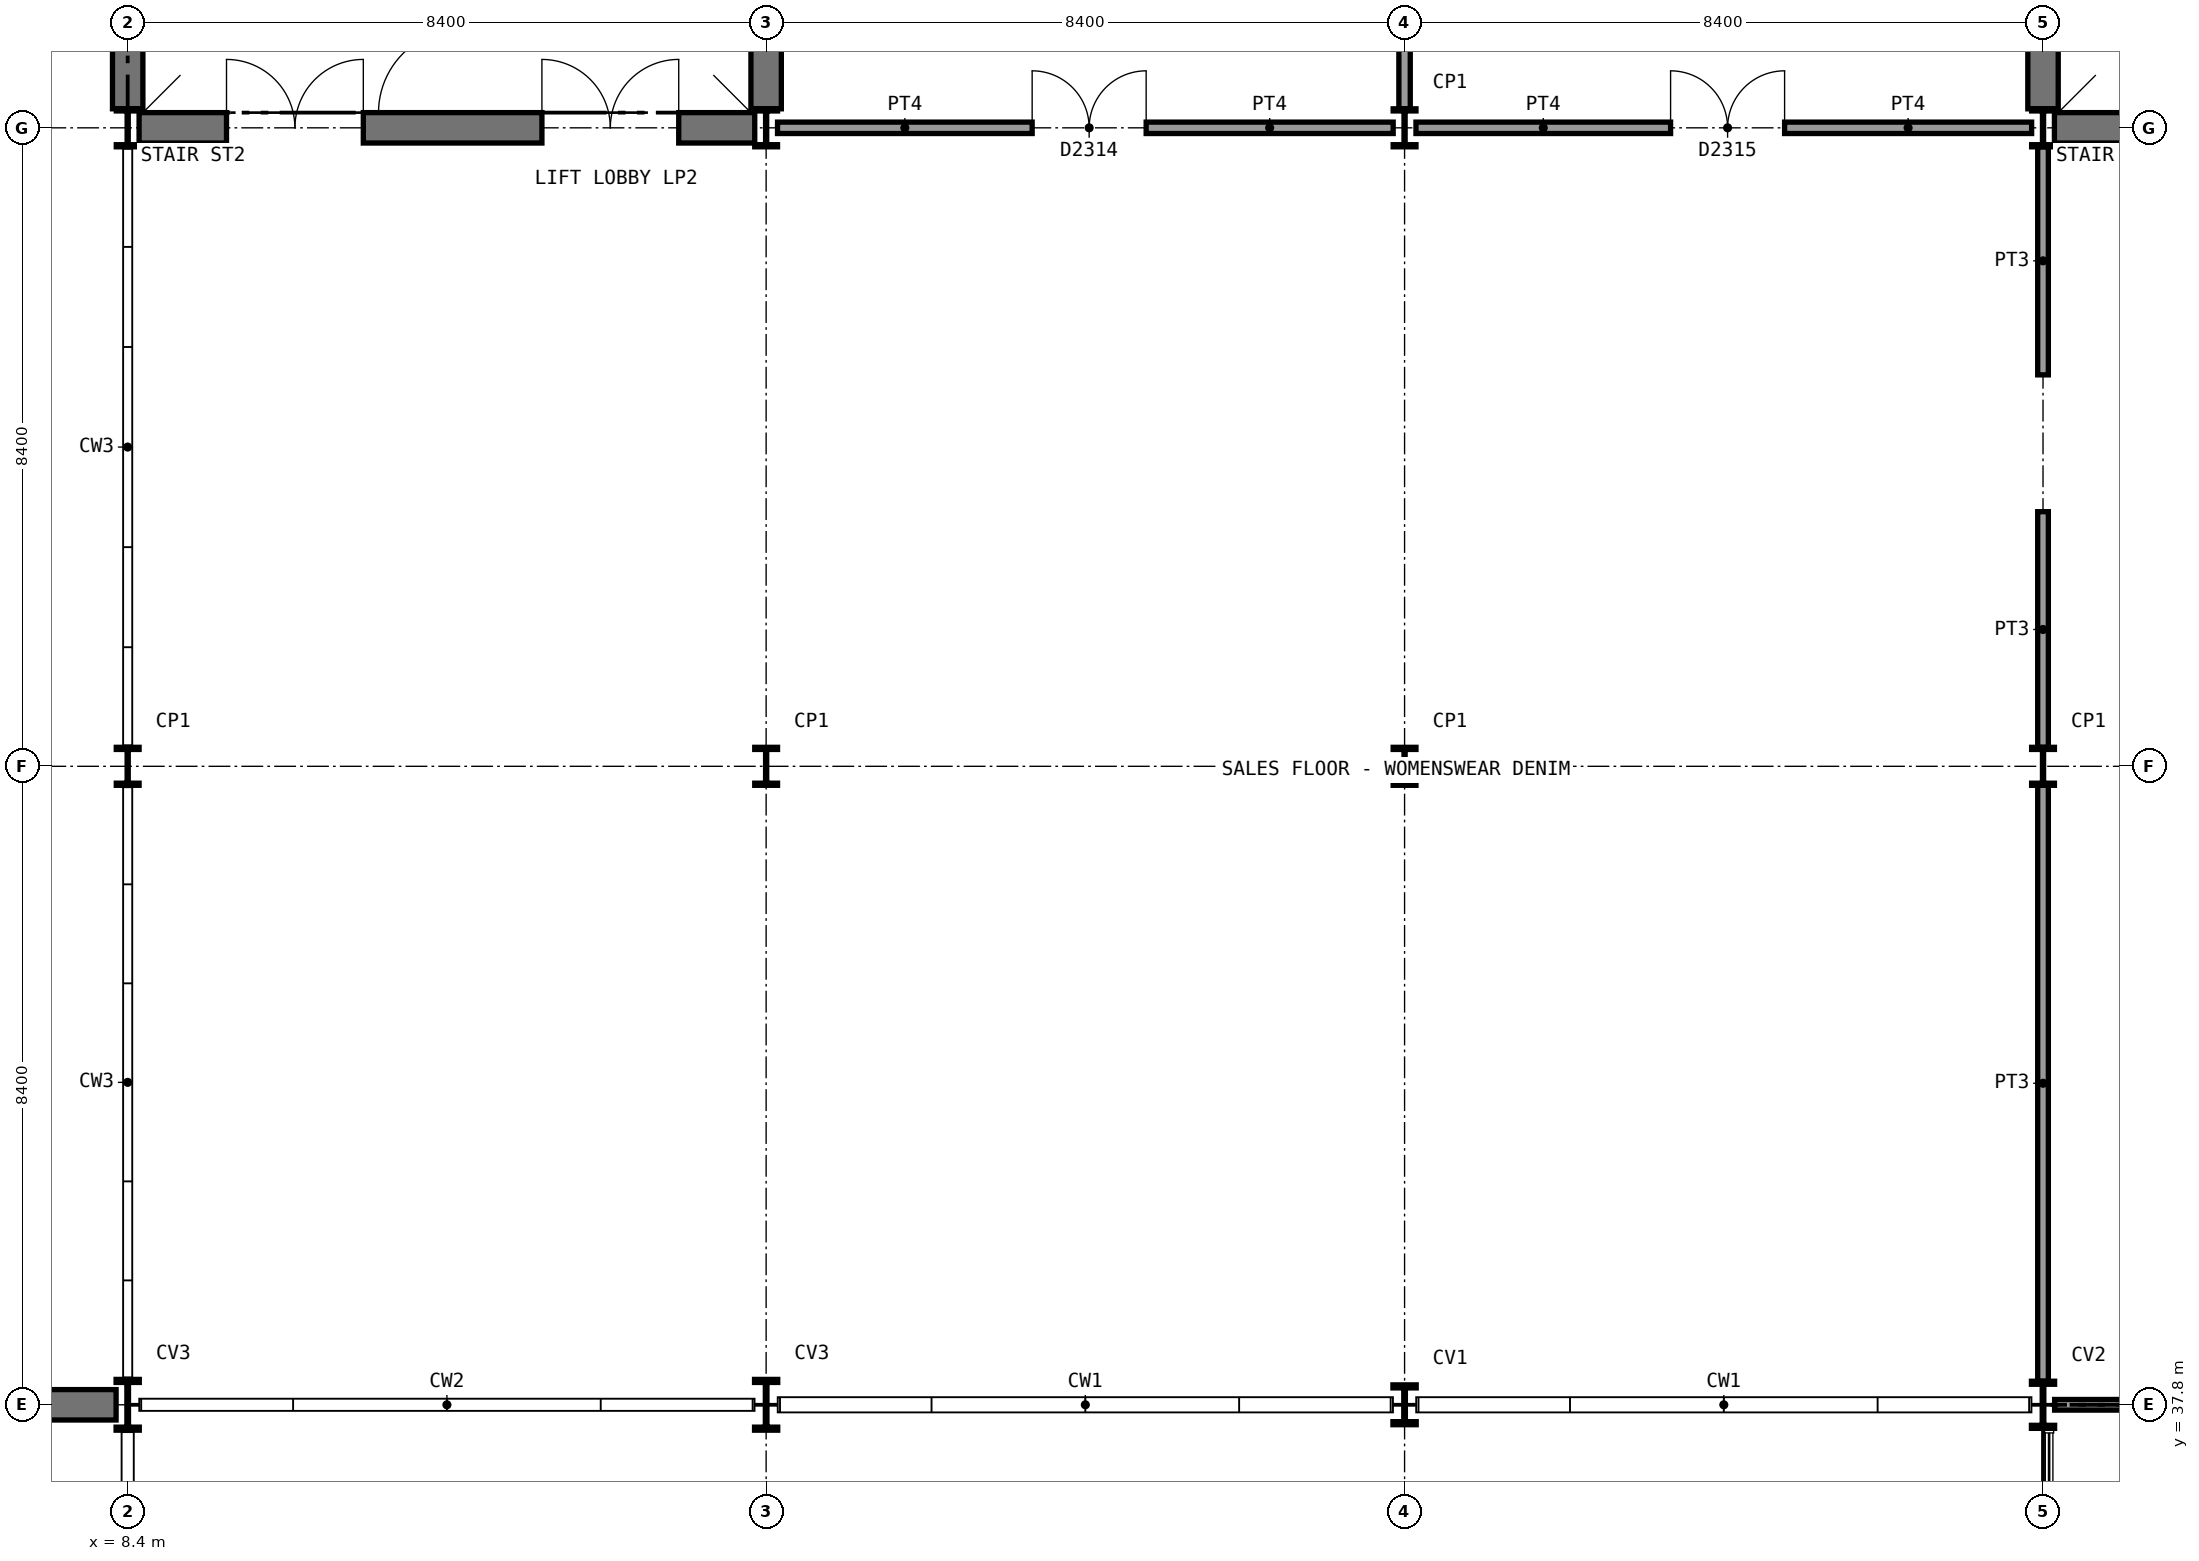
"""IFC4 building model, lengths in metres.
Left out: names, types, materials, properties, quantities, classifications, styles, units other than length and angle.
Written with IfcOpenShell. Run it as: python <this file> out.ifc"""

import sys

from ifc_helpers import new_model, si_unit, direction, frame, frame_2d, origin, origin_2d, place, context, subcontext, project, spatial, rectangle, i_section, extrude, element, fill, save


model = new_model("IFC4")
c1 = context("Model", 3, precision=1e-05, world=origin(), true_north=direction((0.0, 1.0)))
c2 = subcontext(c1, "Body", "Model", "MODEL_VIEW")
j1 = project(units=[si_unit("LENGTHUNIT", "METRE"), si_unit("PLANEANGLEUNIT", "RADIAN")], contexts=[c1])
p1 = place(None, origin())
s1 = spatial("IfcSite", under=j1, at=p1, CompositionType="ELEMENT")
p2 = place(p1, origin())
s2 = spatial("IfcBuilding", under=s1, at=p2, CompositionType="ELEMENT")
p3 = place(p2, frame((0.0, 0.0, 6.0)))
s3 = spatial("IfcBuildingStorey", under=s2, at=p3, CompositionType="ELEMENT", Elevation=6.0)
p4 = place(p3, frame((8.55, 54.6, 0.0), z_axis=(0.0, 0.0, 1.0), x_axis=(1.0, 0.0, 0.0)))
e1 = element("IfcWall", 1, at=p4, inside=s3, PredefinedType="SHEAR", context=c2, shape_type="SweptSolid", body=[
    extrude(rectangle(XDim=8.1, YDim=0.4, at=frame_2d((4.05, 0.0))), origin(), (0.0, 0.0, 1.0), 5.25),
])
p5 = place(p4, frame((1.15, 0.0, 0.0)))
e2 = element("IfcOpeningElement", 2, at=p5, cuts=e1, PredefinedType="OPENING", context=c2, shape_type="SweptSolid", body=[
    extrude(rectangle(XDim=1.8, YDim=2.1, at=frame_2d((0.9, 1.05))), frame((0.0, 0.21, 0.0), z_axis=(0.0, -1.0, 0.0), x_axis=(1.0, 0.0, 0.0)), (0.0, 0.0, 1.0), 0.42),
])
p6 = place(p4, frame((5.3, 0.0, 0.0)))
e3 = element("IfcOpeningElement", 3, at=p6, cuts=e1, PredefinedType="OPENING", context=c2, shape_type="SweptSolid", body=[
    extrude(rectangle(XDim=1.8, YDim=2.1, at=frame_2d((0.9, 1.05))), frame((0.0, 0.21, 0.0), z_axis=(0.0, -1.0, 0.0), x_axis=(1.0, 0.0, 0.0)), (0.0, 0.0, 1.0), 0.42),
])
for number, where, z_axis, x_axis in (
    (4, (8.4, 54.85, 0.0), (0.0, 0.0, 1.0), (0.0, 1.0, 0.0)),
    (5, (16.8, 54.85, 0.0), (0.0, 0.0, 1.0), (0.0, 1.0, 0.0)),
):
    element("IfcWall", number, at=place(p3, frame(where, z_axis=z_axis, x_axis=x_axis)), inside=s3, PredefinedType="SHEAR", context=c2, shape_type="SweptSolid", body=[
        extrude(rectangle(XDim=7.9, YDim=0.4, at=frame_2d((3.95, 0.0))), origin(), (0.0, 0.0, 1.0), 5.25),
    ])
p7 = place(p3, frame((33.75, 54.6, 0.0), z_axis=(0.0, 0.0, 1.0), x_axis=(1.0, 0.0, 0.0)))
e6 = element("IfcWall", 6, at=p7, inside=s3, PredefinedType="SHEAR", context=c2, shape_type="SweptSolid", body=[
    extrude(rectangle(XDim=8.1, YDim=0.4, at=frame_2d((4.05, 0.0))), origin(), (0.0, 0.0, 1.0), 5.25),
])
p8 = place(p7, frame((1.15, 0.0, 0.0)))
e7 = element("IfcOpeningElement", 7, at=p8, cuts=e6, PredefinedType="OPENING", context=c2, shape_type="SweptSolid", body=[
    extrude(rectangle(XDim=1.8, YDim=2.1, at=frame_2d((0.9, 1.05))), frame((0.0, 0.21, 0.0), z_axis=(0.0, -1.0, 0.0), x_axis=(1.0, 0.0, 0.0)), (0.0, 0.0, 1.0), 0.42),
])
p9 = place(p7, frame((5.3, 0.0, 0.0)))
e8 = element("IfcOpeningElement", 8, at=p9, cuts=e6, PredefinedType="OPENING", context=c2, shape_type="SweptSolid", body=[
    extrude(rectangle(XDim=1.8, YDim=2.1, at=frame_2d((0.9, 1.05))), frame((0.0, 0.21, 0.0), z_axis=(0.0, -1.0, 0.0), x_axis=(1.0, 0.0, 0.0)), (0.0, 0.0, 1.0), 0.42),
])
p10 = place(p3, frame((33.6, 54.85, 0.0), z_axis=(0.0, 0.0, 1.0), x_axis=(0.0, 1.0, 0.0)))
e9 = element("IfcWall", 9, at=p10, inside=s3, PredefinedType="SHEAR", context=c2, shape_type="SweptSolid", body=[
    extrude(rectangle(XDim=7.9, YDim=0.4, at=frame_2d((3.95, 0.0))), origin(), (0.0, 0.0, 1.0), 5.25),
])
p11 = place(p3, frame((8.4, 37.8, 0.0), z_axis=(0.0, 0.0, 1.0), x_axis=(1.0, 0.0, 0.0)))
e10 = element("IfcColumn", 10, at=p11, inside=s3, PredefinedType="COLUMN", context=c2, shape_type="SweptSolid", body=[
    extrude(i_section(OverallWidth=0.305, OverallDepth=0.668, WebThickness=0.021, FlangeThickness=0.04, FilletRadius=0.027, at=origin_2d()), origin(), (0.0, 0.0, 1.0), 5.4),
])
for number, where, z_axis, x_axis in (
    (11, (8.4, 46.2, 0.0), (0.0, 0.0, 1.0), (1.0, 0.0, 0.0)),
    (12, (8.4, 54.6, 0.0), (0.0, 0.0, 1.0), (1.0, 0.0, 0.0)),
):
    element("IfcColumn", number, at=place(p3, frame(where, z_axis=z_axis, x_axis=x_axis)), inside=s3, PredefinedType="COLUMN", context=c2, shape_type="SweptSolid", body=[
        extrude(i_section(OverallWidth=0.3, OverallDepth=0.5, WebThickness=0.014, FlangeThickness=0.028, FilletRadius=0.027, at=origin_2d()), origin(), (0.0, 0.0, 1.0), 5.4),
    ])
p12 = place(p3, frame((16.8, 37.8, 0.0), z_axis=(0.0, 0.0, 1.0), x_axis=(1.0, 0.0, 0.0)))
e13 = element("IfcColumn", 13, at=p12, inside=s3, PredefinedType="COLUMN", context=c2, shape_type="SweptSolid", body=[
    extrude(i_section(OverallWidth=0.305, OverallDepth=0.668, WebThickness=0.021, FlangeThickness=0.04, FilletRadius=0.027, at=origin_2d()), origin(), (0.0, 0.0, 1.0), 5.4),
])
for number, where, z_axis, x_axis in (
    (14, (16.8, 46.2, 0.0), (0.0, 0.0, 1.0), (1.0, 0.0, 0.0)),
    (15, (16.8, 54.6, 0.0), (0.0, 0.0, 1.0), (1.0, 0.0, 0.0)),
):
    element("IfcColumn", number, at=place(p3, frame(where, z_axis=z_axis, x_axis=x_axis)), inside=s3, PredefinedType="COLUMN", context=c2, shape_type="SweptSolid", body=[
        extrude(i_section(OverallWidth=0.3, OverallDepth=0.5, WebThickness=0.014, FlangeThickness=0.028, FilletRadius=0.027, at=origin_2d()), origin(), (0.0, 0.0, 1.0), 5.4),
    ])
p13 = place(p3, frame((25.2, 37.8, 0.0), z_axis=(0.0, 0.0, 1.0), x_axis=(1.0, 0.0, 0.0)))
e16 = element("IfcColumn", 16, at=p13, inside=s3, PredefinedType="COLUMN", context=c2, shape_type="SweptSolid", body=[
    extrude(i_section(OverallWidth=0.306, OverallDepth=0.524, WebThickness=0.021, FlangeThickness=0.04, FilletRadius=0.027, at=origin_2d()), origin(), (0.0, 0.0, 1.0), 5.4),
])
for number, where, z_axis, x_axis in (
    (17, (25.2, 46.2, 0.0), (0.0, 0.0, 1.0), (1.0, 0.0, 0.0)),
    (18, (25.2, 54.6, 0.0), (0.0, 0.0, 1.0), (1.0, 0.0, 0.0)),
):
    element("IfcColumn", number, at=place(p3, frame(where, z_axis=z_axis, x_axis=x_axis)), inside=s3, PredefinedType="COLUMN", context=c2, shape_type="SweptSolid", body=[
        extrude(i_section(OverallWidth=0.3, OverallDepth=0.5, WebThickness=0.014, FlangeThickness=0.028, FilletRadius=0.027, at=origin_2d()), origin(), (0.0, 0.0, 1.0), 5.4),
    ])
p14 = place(p3, frame((33.6, 37.8, 0.0), z_axis=(0.0, 0.0, 1.0), x_axis=(1.0, 0.0, 0.0)))
e19 = element("IfcColumn", 19, at=p14, inside=s3, PredefinedType="COLUMN", context=c2, shape_type="SweptSolid", body=[
    extrude(i_section(OverallWidth=0.305, OverallDepth=0.62, WebThickness=0.021, FlangeThickness=0.04, FilletRadius=0.027, at=origin_2d()), origin(), (0.0, 0.0, 1.0), 5.4),
])
for number, where, z_axis, x_axis in (
    (20, (33.6, 46.2, 0.0), (0.0, 0.0, 1.0), (1.0, 0.0, 0.0)),
    (21, (33.6, 54.6, 0.0), (0.0, 0.0, 1.0), (1.0, 0.0, 0.0)),
):
    element("IfcColumn", number, at=place(p3, frame(where, z_axis=z_axis, x_axis=x_axis)), inside=s3, PredefinedType="COLUMN", context=c2, shape_type="SweptSolid", body=[
        extrude(i_section(OverallWidth=0.3, OverallDepth=0.5, WebThickness=0.014, FlangeThickness=0.028, FilletRadius=0.027, at=origin_2d()), origin(), (0.0, 0.0, 1.0), 5.4),
    ])
p15 = place(p3, frame((25.2, 54.85, 0.0), z_axis=(0.0, 0.0, 1.0), x_axis=(0.0, 1.0, 0.0)))
e22 = element("IfcWall", 22, at=p15, inside=s3, PredefinedType="SOLIDWALL", context=c2, shape_type="SweptSolid", body=[
    extrude(rectangle(XDim=7.9, YDim=0.15, at=frame_2d((3.95, 0.0))), origin(), (0.0, 0.0, 1.0), 4.81),
])
p16 = place(p3, frame((16.95, 54.6, 0.0), z_axis=(0.0, 0.0, 1.0), x_axis=(1.0, 0.0, 0.0)))
e23 = element("IfcWall", 23, at=p16, inside=s3, PredefinedType="SOLIDWALL", context=c2, shape_type="SweptSolid", body=[
    extrude(rectangle(XDim=8.1, YDim=0.15, at=frame_2d((4.05, 0.0))), origin(), (0.0, 0.0, 1.0), 4.92),
])
p17 = place(p16, frame((3.35, 0.0, 0.0)))
e24 = element("IfcOpeningElement", 24, at=p17, cuts=e23, PredefinedType="OPENING", context=c2, shape_type="SweptSolid", body=[
    extrude(rectangle(XDim=1.5, YDim=2.1, at=frame_2d((0.75, 1.05))), frame((0.0, 0.085, 0.0), z_axis=(0.0, -1.0, 0.0), x_axis=(1.0, 0.0, 0.0)), (0.0, 0.0, 1.0), 0.17),
])
p18 = place(p3, frame((25.35, 54.6, 0.0), z_axis=(0.0, 0.0, 1.0), x_axis=(1.0, 0.0, 0.0)))
e25 = element("IfcWall", 25, at=p18, inside=s3, PredefinedType="SOLIDWALL", context=c2, shape_type="SweptSolid", body=[
    extrude(rectangle(XDim=8.1, YDim=0.15, at=frame_2d((4.05, 0.0))), origin(), (0.0, 0.0, 1.0), 4.92),
])
p19 = place(p18, frame((3.35, 0.0, 0.0)))
e26 = element("IfcOpeningElement", 26, at=p19, cuts=e25, PredefinedType="OPENING", context=c2, shape_type="SweptSolid", body=[
    extrude(rectangle(XDim=1.5, YDim=2.1, at=frame_2d((0.75, 1.05))), frame((0.0, 0.085, 0.0), z_axis=(0.0, -1.0, 0.0), x_axis=(1.0, 0.0, 0.0)), (0.0, 0.0, 1.0), 0.17),
])
p20 = place(p3, frame((33.6, 38.11, 0.0), z_axis=(0.0, 0.0, 1.0), x_axis=(0.0, 1.0, 0.0)))
e27 = element("IfcWall", 27, at=p20, inside=s3, PredefinedType="PARTITIONING", context=c2, shape_type="SweptSolid", body=[
    extrude(rectangle(XDim=7.84, YDim=0.14, at=frame_2d((3.92, 0.0))), origin(), (0.0, 0.0, 1.0), 4.81),
])
p21 = place(p3, frame((33.6, 46.45, 0.0), z_axis=(0.0, 0.0, 1.0), x_axis=(0.0, 1.0, 0.0)))
e28 = element("IfcWall", 28, at=p21, inside=s3, PredefinedType="PARTITIONING", context=c2, shape_type="SweptSolid", body=[
    extrude(rectangle(XDim=3.1, YDim=0.14, at=frame_2d((1.55, 0.0))), origin(), (0.0, 0.0, 1.0), 4.81),
])
p22 = place(p3, frame((33.6, 51.35, 0.0), z_axis=(0.0, 0.0, 1.0), x_axis=(0.0, 1.0, 0.0)))
e29 = element("IfcWall", 29, at=p22, inside=s3, PredefinedType="PARTITIONING", context=c2, shape_type="SweptSolid", body=[
    extrude(rectangle(XDim=3.0, YDim=0.14, at=frame_2d((1.5, 0.0))), origin(), (0.0, 0.0, 1.0), 4.81),
])
p23 = place(p3, frame((33.753, 37.8, 0.0), z_axis=(0.0, 0.0, 1.0), x_axis=(1.0, 0.0, 0.0)))
e30 = element("IfcWall", 30, at=p23, inside=s3, PredefinedType="PARTITIONING", context=c2, shape_type="SweptSolid", body=[
    extrude(rectangle(XDim=3.1, YDim=0.14, at=frame_2d((1.55, 0.0))), origin(), (0.0, 0.0, 1.0), 4.81),
])
p24 = place(p3, frame((0.305, 37.8, 0.0), z_axis=(0.0, 0.0, 1.0), x_axis=(1.0, 0.0, 0.0)))
e31 = element("IfcWall", 31, at=p24, inside=s3, PredefinedType="STANDARD", context=c2, shape_type="SweptSolid", body=[
    extrude(rectangle(XDim=7.942, YDim=0.4, at=frame_2d((3.971, 0.0))), origin(), (0.0, 0.0, 1.0), 5.25),
])
p25 = place(p3, frame((12.8, 62.8, 0.0), z_axis=(0.0, 0.0, 1.0), x_axis=(0.0, -1.0, 0.0)))
e32 = element("IfcWall", 32, at=p25, inside=s3, PredefinedType="SHEAR", context=c2, shape_type="SweptSolid", body=[
    extrude(rectangle(XDim=8.0, YDim=0.2, at=frame_2d((4.0, 0.0))), origin(), (0.0, 0.0, 1.0), 5.25),
])
p26 = place(p25, frame((6.9, 0.0, 0.0)))
e33 = element("IfcOpeningElement", 33, at=p26, cuts=e32, PredefinedType="OPENING", context=c2, shape_type="SweptSolid", body=[
    extrude(rectangle(XDim=1.11, YDim=2.1, at=frame_2d((0.555, 1.05))), frame((0.0, 0.11, 0.0), z_axis=(0.0, -1.0, 0.0), x_axis=(1.0, 0.0, 0.0)), (0.0, 0.0, 1.0), 0.22),
])
p27 = place(p17, origin())
e34 = element("IfcDoor", 34, at=p27, inside=s3, OperationType="DOUBLE_DOOR_SINGLE_SWING", PredefinedType="DOOR", context=c2, shape_type="SweptSolid", body=[
    extrude(rectangle(XDim=1.5, YDim=2.1, at=frame_2d((0.75, 1.05))), frame((0.0, 0.025, 0.0), z_axis=(0.0, -1.0, 0.0), x_axis=(1.0, 0.0, 0.0)), (0.0, 0.0, 1.0), 0.05),
])
fill(e24, e34)
p28 = place(p19, origin())
e35 = element("IfcDoor", 35, at=p28, inside=s3, OperationType="DOUBLE_DOOR_SINGLE_SWING", PredefinedType="DOOR", context=c2, shape_type="SweptSolid", body=[
    extrude(rectangle(XDim=1.5, YDim=2.1, at=frame_2d((0.75, 1.05))), frame((0.0, 0.025, 0.0), z_axis=(0.0, -1.0, 0.0), x_axis=(1.0, 0.0, 0.0)), (0.0, 0.0, 1.0), 0.05),
])
fill(e26, e35)
p29 = place(p26, frame((1.1, 0.0, 0.0), z_axis=(0.0, 0.0, 1.0), x_axis=(-1.0, 0.0, 0.0)))
e36 = element("IfcDoor", 36, at=p29, inside=s3, OperationType="SINGLE_SWING_LEFT", PredefinedType="DOOR", context=c2, shape_type="SweptSolid", body=[
    extrude(rectangle(XDim=1.1, YDim=2.1, at=frame_2d((0.55, 1.05))), frame((0.0, 0.025, 0.0), z_axis=(0.0, -1.0, 0.0), x_axis=(1.0, 0.0, 0.0)), (0.0, 0.0, 1.0), 0.05),
])
fill(e33, e36)
p30 = place(p5, origin())
e37 = element("IfcDoor", 37, at=p30, inside=s3, OperationType="DOUBLE_DOOR_SINGLE_SWING", PredefinedType="DOOR", context=c2, shape_type="SweptSolid", body=[
    extrude(rectangle(XDim=1.8, YDim=2.1, at=frame_2d((0.9, 1.05))), frame((0.0, 0.025, 0.0), z_axis=(0.0, -1.0, 0.0), x_axis=(1.0, 0.0, 0.0)), (0.0, 0.0, 1.0), 0.05),
])
fill(e2, e37)
p31 = place(p6, origin())
e38 = element("IfcDoor", 38, at=p31, inside=s3, OperationType="DOUBLE_DOOR_SINGLE_SWING", PredefinedType="DOOR", context=c2, shape_type="SweptSolid", body=[
    extrude(rectangle(XDim=1.8, YDim=2.1, at=frame_2d((0.9, 1.05))), frame((0.0, 0.025, 0.0), z_axis=(0.0, -1.0, 0.0), x_axis=(1.0, 0.0, 0.0)), (0.0, 0.0, 1.0), 0.05),
])
fill(e3, e38)
save(model, sys.argv[1])
